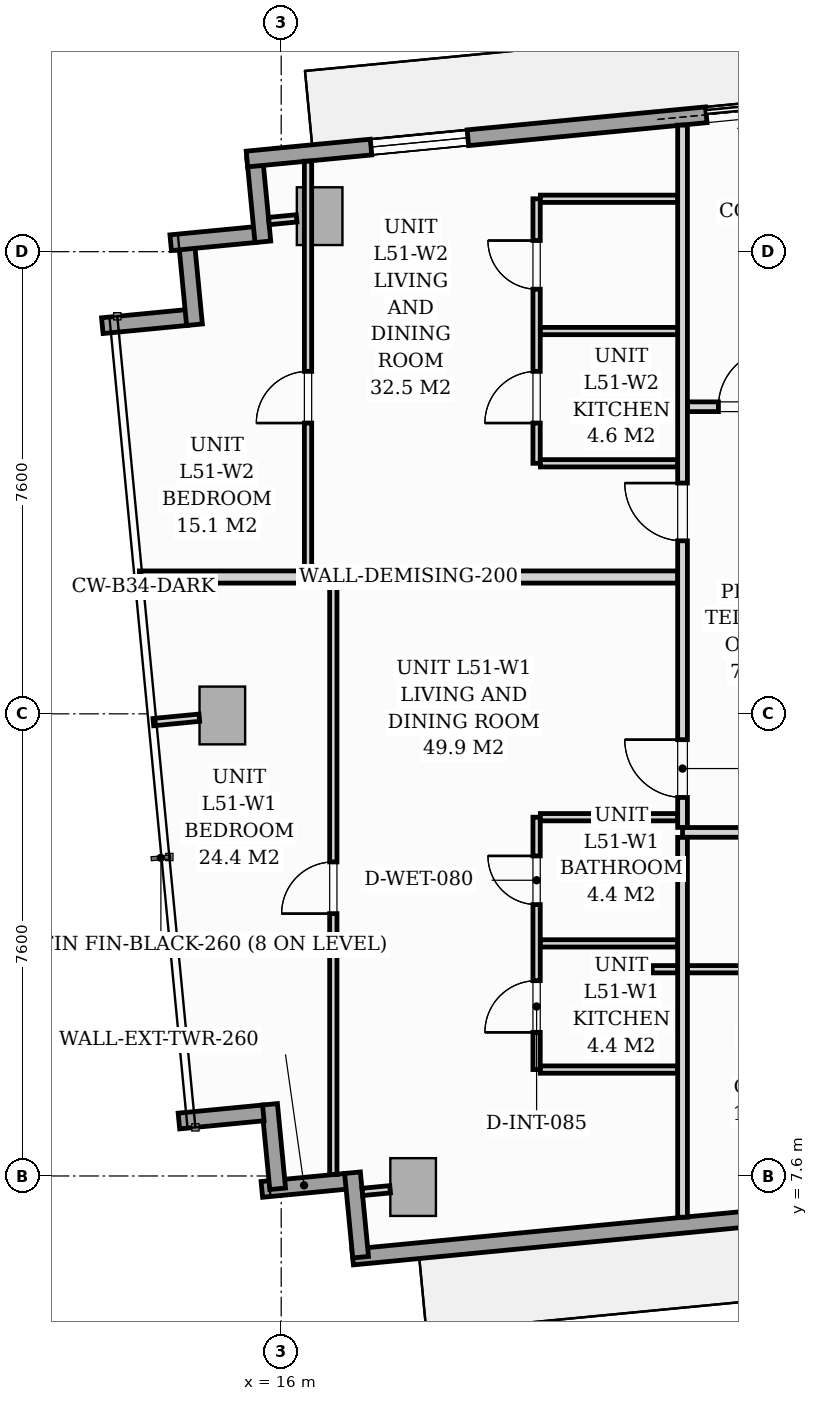
"""IFC4 building model, lengths in metres.
Left out: names, types, materials, properties, quantities, classifications, styles, units other than length and angle.
Written with IfcOpenShell. Run it as: python <this file> out.ifc"""

import sys

from ifc_helpers import new_model, si_unit, direction, frame, frame_2d, origin, origin_2d, place, context, subcontext, project, spatial, rectangle, extrude, source, transform, mapped, element, fill, save


model = new_model("IFC4")
c1 = context("Model", 3, precision=1e-05, world=origin(), true_north=direction((0.0, 1.0)))
c2 = subcontext(c1, "Body", "Model", "MODEL_VIEW")
j1 = project(units=[si_unit("LENGTHUNIT", "METRE"), si_unit("PLANEANGLEUNIT", "RADIAN")], contexts=[c1])
p1 = place(None, origin())
s1 = spatial("IfcSite", under=j1, at=p1, CompositionType="ELEMENT")
p2 = place(p1, origin())
s2 = spatial("IfcBuilding", under=s1, at=p2, CompositionType="ELEMENT")
p3 = place(p2, frame((0.0, 0.0, 179.4)))
s3 = spatial("IfcBuildingStorey", under=s2, at=p3, CompositionType="ELEMENT", Elevation=179.4)
m1 = source(origin(), c2, "Body", "SweptSolid", [
    extrude(rectangle(XDim=0.75, YDim=0.95, at=origin_2d()), origin(), (0.0, 0.0, 1.0), 3.196),
])
for number, where, z_axis, x_axis in (
    (1, (18.169, 7.418, 0.002), (0.0, 0.0, 1.0), (0.995, 0.096, 0.0)),
    (2, (16.632, 23.384, 0.002), (0.0, 0.0, 1.0), (0.995, 0.096, 0.0)),
    (3, (15.032, 15.173, 0.002), (0.0, 0.0, 1.0), (0.995, 0.096, 0.0)),
):
    element("IfcColumn", number, at=place(p3, frame(where, z_axis=z_axis, x_axis=x_axis)), inside=s3, PredefinedType="COLUMN", context=c2, shape_type="MappedRepresentation", body=[
        mapped(m1, transform((0.0, 0.0, 0.0), scale=1.0)),
    ])
p4 = place(p3, frame((17.07, 7.513, 0.0), z_axis=(0.0, 0.0, 1.0), x_axis=(-0.995391056452, -0.09589913835, 0.0)))
e4 = element("IfcWall", 4, at=p4, inside=s3, PredefinedType="STANDARD", context=c2, shape_type="SweptSolid", body=[
    extrude(rectangle(XDim=1.395, YDim=0.26, at=frame_2d((0.698, 0.0))), origin(), (0.0, 0.0, 1.0), 2.94),
])
p5 = place(p3, frame((15.942, 7.389, 0.0), z_axis=(0.0, 0.0, 1.0), x_axis=(-0.095742423056, 0.99540614245, 0.0)))
e5 = element("IfcWall", 5, at=p5, inside=s3, PredefinedType="STANDARD", context=c2, shape_type="SweptSolid", body=[
    extrude(rectangle(XDim=1.395, YDim=0.26, at=frame_2d((0.697, 0.0))), origin(), (0.0, 0.0, 1.0), 2.94),
])
for number, where, z_axis, x_axis in (
    (6, (15.706, 8.637, 0.0), (0.0, 0.0, 1.0), (-0.995, -0.096, 0.0)),
    (7, (13.058, 21.583, 0.0), (0.0, 0.0, 1.0), (0.995, 0.096, 0.0)),
):
    element("IfcWall", number, at=place(p3, frame(where, z_axis=z_axis, x_axis=x_axis)), inside=s3, PredefinedType="STANDARD", context=c2, shape_type="SweptSolid", body=[
        extrude(rectangle(XDim=1.395, YDim=0.26, at=frame_2d((0.698, 0.0))), origin(), (0.0, 0.0, 1.0), 2.94),
    ])
for number, where, z_axis, x_axis in (
    (8, (14.574, 21.599, 0.0), (0.0, 0.0, 1.0), (-0.096, 0.995, 0.0)),
    (9, (14.183, 22.947, 0.0), (0.0, 0.0, 1.0), (0.995, 0.096, 0.0)),
):
    element("IfcWall", number, at=place(p3, frame(where, z_axis=z_axis, x_axis=x_axis)), inside=s3, PredefinedType="STANDARD", context=c2, shape_type="SweptSolid", body=[
        extrude(rectangle(XDim=1.395, YDim=0.26, at=frame_2d((0.697, 0.0))), origin(), (0.0, 0.0, 1.0), 2.94),
    ])
p6 = place(p3, frame((15.698, 22.963, 0.0), z_axis=(0.0, 0.0, 1.0), x_axis=(-0.09589913835, 0.995391056452, 0.0)))
e10 = element("IfcWall", 10, at=p6, inside=s3, PredefinedType="STANDARD", context=c2, shape_type="SweptSolid", body=[
    extrude(rectangle(XDim=1.395, YDim=0.26, at=frame_2d((0.698, 0.0))), origin(), (0.0, 0.0, 1.0), 2.94),
])
p7 = place(p3, frame((15.437, 24.324, 0.0), z_axis=(0.0, 0.0, 1.0), x_axis=(0.995395627913, 0.095851676732, 0.0)))
e11 = element("IfcWall", 11, at=p7, inside=s3, PredefinedType="STANDARD", context=c2, shape_type="SweptSolid", body=[
    extrude(rectangle(XDim=16.1, YDim=0.26, at=frame_2d((8.05, 0.0))), origin(), (0.0, 0.0, 1.0), 2.94),
])
p8 = place(p7, frame((7.589, 0.0, 0.0)))
e12 = element("IfcOpeningElement", 12, at=p8, cuts=e11, PredefinedType="OPENING", context=c2, shape_type="SweptSolid", body=[
    extrude(rectangle(XDim=1.8, YDim=2.06, at=frame_2d((0.9, 1.03))), frame((0.0, 0.14, 0.0), z_axis=(0.0, -1.0, 0.0), x_axis=(1.0, 0.0, 0.0)), (0.0, 0.0, 1.0), 0.28),
])
p9 = place(p7, frame((2.05, 0.0, 0.65)))
e13 = element("IfcOpeningElement", 13, at=p9, cuts=e11, PredefinedType="OPENING", context=c2, shape_type="SweptSolid", body=[
    extrude(rectangle(XDim=1.6, YDim=1.5, at=frame_2d((0.8, 0.75))), frame((0.0, 0.14, 0.0), z_axis=(0.0, -1.0, 0.0), x_axis=(1.0, 0.0, 0.0)), (0.0, 0.0, 1.0), 0.28),
])
p10 = place(p3, frame((33.201, 7.81, 0.0), z_axis=(0.0, 0.0, 1.0), x_axis=(-0.995397074604, -0.095836652014, 0.0)))
e14 = element("IfcWall", 14, at=p10, inside=s3, PredefinedType="STANDARD", context=c2, shape_type="SweptSolid", body=[
    extrude(rectangle(XDim=16.1, YDim=0.26, at=frame_2d((8.05, 0.0))), origin(), (0.0, 0.0, 1.0), 2.94),
])
p11 = place(p10, frame((7.63, 0.0, 0.0)))
e15 = element("IfcOpeningElement", 15, at=p11, cuts=e14, PredefinedType="OPENING", context=c2, shape_type="SweptSolid", body=[
    extrude(rectangle(XDim=1.8, YDim=2.06, at=frame_2d((0.9, 1.03))), frame((0.0, 0.14, 0.0), z_axis=(0.0, -1.0, 0.0), x_axis=(1.0, 0.0, 0.0)), (0.0, 0.0, 1.0), 0.28),
])
p12 = place(p10, frame((0.7, 0.0, 0.65)))
e16 = element("IfcOpeningElement", 16, at=p12, cuts=e14, PredefinedType="OPENING", context=c2, shape_type="SweptSolid", body=[
    extrude(rectangle(XDim=1.6, YDim=1.5, at=frame_2d((0.8, 0.75))), frame((0.0, 0.14, 0.0), z_axis=(0.0, -1.0, 0.0), x_axis=(1.0, 0.0, 0.0)), (0.0, 0.0, 1.0), 0.28),
])
p13 = place(p3, frame((17.306, 6.265, 0.0), z_axis=(0.0, 0.0, 1.0), x_axis=(-0.095915846097, 0.995389446633, 0.0)))
e17 = element("IfcWall", 17, at=p13, inside=s3, PredefinedType="STANDARD", context=c2, shape_type="SweptSolid", body=[
    extrude(rectangle(XDim=1.395, YDim=0.26, at=frame_2d((0.697, 0.0))), origin(), (0.0, 0.0, 1.0), 2.94),
])
p14 = place(p3, frame((22.6, 13.25, 0.0), z_axis=(0.0, 0.0, 1.0), x_axis=(1.0, 0.0, 0.0)))
e18 = element("IfcWall", 18, at=p14, inside=s3, PredefinedType="PARTITIONING", context=c2, shape_type="SweptSolid", body=[
    extrude(rectangle(XDim=23.28, YDim=0.16, at=frame_2d((11.64, 0.0))), origin(), (0.0, 0.0, 1.0), 2.94),
])
p15 = place(p14, frame((3.335, 0.0, 0.0)))
e19 = element("IfcOpeningElement", 19, at=p15, cuts=e18, PredefinedType="OPENING", context=c2, shape_type="SweptSolid", body=[
    extrude(rectangle(XDim=0.95, YDim=2.06, at=frame_2d((0.475, 1.03))), frame((0.0, 0.09, 0.0), z_axis=(0.0, -1.0, 0.0), x_axis=(1.0, 0.0, 0.0)), (0.0, 0.0, 1.0), 0.18),
])
p16 = place(p14, frame((15.096, 0.0, 0.0)))
e20 = element("IfcOpeningElement", 20, at=p16, cuts=e18, PredefinedType="OPENING", context=c2, shape_type="SweptSolid", body=[
    extrude(rectangle(XDim=0.95, YDim=2.06, at=frame_2d((0.475, 1.03))), frame((0.0, 0.09, 0.0), z_axis=(0.0, -1.0, 0.0), x_axis=(1.0, 0.0, 0.0)), (0.0, 0.0, 1.0), 0.18),
])
p17 = place(p3, frame((22.6, 6.922, 0.0), z_axis=(0.0, 0.0, 1.0), x_axis=(0.0, 1.0, 0.0)))
e21 = element("IfcWall", 21, at=p17, inside=s3, PredefinedType="PARTITIONING", context=c2, shape_type="SweptSolid", body=[
    extrude(rectangle(XDim=6.246, YDim=0.16, at=frame_2d((3.123, 0.0))), origin(), (0.0, 0.0, 1.0), 2.94),
])
p18 = place(p3, frame((22.6, 13.332, 0.0), z_axis=(0.0, 0.0, 1.0), x_axis=(0.0, 1.0, 0.0)))
e22 = element("IfcWall", 22, at=p18, inside=s3, PredefinedType="PARTITIONING", context=c2, shape_type="SweptSolid", body=[
    extrude(rectangle(XDim=11.549, YDim=0.16, at=frame_2d((5.774, 0.0))), origin(), (0.0, 0.0, 1.0), 2.94),
])
p19 = place(p18, frame((0.493, 0.0, 0.0)))
e23 = element("IfcOpeningElement", 23, at=p19, cuts=e22, PredefinedType="OPENING", context=c2, shape_type="SweptSolid", body=[
    extrude(rectangle(XDim=0.95, YDim=2.06, at=frame_2d((0.475, 1.03))), frame((0.0, 0.09, 0.0), z_axis=(0.0, -1.0, 0.0), x_axis=(1.0, 0.0, 0.0)), (0.0, 0.0, 1.0), 0.18),
])
p20 = place(p18, frame((4.713, 0.0, 0.0)))
e24 = element("IfcOpeningElement", 24, at=p20, cuts=e22, PredefinedType="OPENING", context=c2, shape_type="SweptSolid", body=[
    extrude(rectangle(XDim=0.95, YDim=2.06, at=frame_2d((0.475, 1.03))), frame((0.0, 0.09, 0.0), z_axis=(0.0, -1.0, 0.0), x_axis=(1.0, 0.0, 0.0)), (0.0, 0.0, 1.0), 0.18),
])
p21 = place(p3, frame((22.1, 11.0, 0.0), z_axis=(0.0, 0.0, 1.0), x_axis=(1.0, 0.0, 0.0)))
e25 = element("IfcWall", 25, at=p21, inside=s3, PredefinedType="PARTITIONING", context=c2, shape_type="SweptSolid", body=[
    extrude(rectangle(XDim=0.418, YDim=0.12, at=frame_2d((0.209, 0.0))), origin(), (0.0, 0.0, 1.0), 2.94),
])
p22 = place(p3, frame((22.682, 11.0, 0.0), z_axis=(0.0, 0.0, 1.0), x_axis=(1.0, 0.0, 0.0)))
e26 = element("IfcWall", 26, at=p22, inside=s3, PredefinedType="PARTITIONING", context=c2, shape_type="SweptSolid", body=[
    extrude(rectangle(XDim=3.219, YDim=0.12, at=frame_2d((1.609, 0.0))), origin(), (0.0, 0.0, 1.0), 2.94),
])
p23 = place(p3, frame((13.667, 17.45, 0.0), z_axis=(0.0, 0.0, 1.0), x_axis=(1.0, 0.0, 0.0)))
e27 = element("IfcWall", 27, at=p23, inside=s3, PredefinedType="PARTITIONING", context=c2, shape_type="SweptSolid", body=[
    extrude(rectangle(XDim=8.851, YDim=0.2, at=frame_2d((4.425, 0.0))), origin(), (0.0, 0.0, 1.0), 2.94),
])
p24 = place(p3, frame((20.2, 9.35, 0.0), z_axis=(0.0, 0.0, 1.0), x_axis=(0.0, 1.0, 0.0)))
e28 = element("IfcWall", 28, at=p24, inside=s3, PredefinedType="PARTITIONING", context=c2, shape_type="SweptSolid", body=[
    extrude(rectangle(XDim=4.15, YDim=0.12, at=frame_2d((2.075, 0.0))), origin(), (0.0, 0.0, 1.0), 2.94),
])
p25 = place(p24, frame((0.612, 0.0, 0.0)))
e29 = element("IfcOpeningElement", 29, at=p25, cuts=e28, PredefinedType="OPENING", context=c2, shape_type="SweptSolid", body=[
    extrude(rectangle(XDim=0.85, YDim=2.05, at=frame_2d((0.425, 1.025))), frame((0.0, 0.07, 0.0), z_axis=(0.0, -1.0, 0.0), x_axis=(1.0, 0.0, 0.0)), (0.0, 0.0, 1.0), 0.14),
])
p26 = place(p24, frame((2.713, 0.0, 0.0)))
e30 = element("IfcOpeningElement", 30, at=p26, cuts=e28, PredefinedType="OPENING", context=c2, shape_type="SweptSolid", body=[
    extrude(rectangle(XDim=0.8, YDim=2.02, at=frame_2d((0.4, 1.01))), frame((0.0, 0.07, 0.0), z_axis=(0.0, -1.0, 0.0), x_axis=(1.0, 0.0, 0.0)), (0.0, 0.0, 1.0), 0.14),
])
for number, where, z_axis, x_axis in (
    (31, (20.262, 11.425, 0.0), (0.0, 0.0, 1.0), (1.0, 0.0, 0.0)),
    (32, (20.262, 9.35, 0.0), (0.0, 0.0, 1.0), (1.0, 0.0, 0.0)),
    (33, (20.262, 13.5, 0.0), (0.0, 0.0, 1.0), (1.0, 0.0, 0.0)),
):
    element("IfcWall", number, at=place(p3, frame(where, z_axis=z_axis, x_axis=x_axis)), inside=s3, PredefinedType="PARTITIONING", context=c2, shape_type="SweptSolid", body=[
        extrude(rectangle(XDim=2.256, YDim=0.12, at=frame_2d((1.128, 0.0))), origin(), (0.0, 0.0, 1.0), 2.94),
    ])
p27 = place(p3, frame((16.857, 7.625, 0.0), z_axis=(0.0, 0.0, 1.0), x_axis=(0.0, 1.0, 0.0)))
e34 = element("IfcWall", 34, at=p27, inside=s3, PredefinedType="PARTITIONING", context=c2, shape_type="SweptSolid", body=[
    extrude(rectangle(XDim=9.723, YDim=0.12, at=frame_2d((4.861, 0.0))), origin(), (0.0, 0.0, 1.0), 2.94),
])
p28 = place(p27, frame((4.289, 0.0, 0.0)))
e35 = element("IfcOpeningElement", 35, at=p28, cuts=e34, PredefinedType="OPENING", context=c2, shape_type="SweptSolid", body=[
    extrude(rectangle(XDim=0.85, YDim=2.05, at=frame_2d((0.425, 1.025))), frame((0.0, 0.07, 0.0), z_axis=(0.0, -1.0, 0.0), x_axis=(1.0, 0.0, 0.0)), (0.0, 0.0, 1.0), 0.14),
])
p29 = place(p3, frame((20.2, 19.32, 0.0), z_axis=(0.0, 0.0, 1.0), x_axis=(0.0, 1.0, 0.0)))
e36 = element("IfcWall", 36, at=p29, inside=s3, PredefinedType="PARTITIONING", context=c2, shape_type="SweptSolid", body=[
    extrude(rectangle(XDim=4.35, YDim=0.12, at=frame_2d((2.175, 0.0))), origin(), (0.0, 0.0, 1.0), 2.94),
])
p30 = place(p29, frame((0.662, 0.0, 0.0)))
e37 = element("IfcOpeningElement", 37, at=p30, cuts=e36, PredefinedType="OPENING", context=c2, shape_type="SweptSolid", body=[
    extrude(rectangle(XDim=0.85, YDim=2.05, at=frame_2d((0.425, 1.025))), frame((0.0, 0.07, 0.0), z_axis=(0.0, -1.0, 0.0), x_axis=(1.0, 0.0, 0.0)), (0.0, 0.0, 1.0), 0.14),
])
p31 = place(p29, frame((2.863, 0.0, 0.0)))
e38 = element("IfcOpeningElement", 38, at=p31, cuts=e36, PredefinedType="OPENING", context=c2, shape_type="SweptSolid", body=[
    extrude(rectangle(XDim=0.8, YDim=2.02, at=frame_2d((0.4, 1.01))), frame((0.0, 0.07, 0.0), z_axis=(0.0, -1.0, 0.0), x_axis=(1.0, 0.0, 0.0)), (0.0, 0.0, 1.0), 0.14),
])
for number, where, z_axis, x_axis in (
    (39, (20.262, 21.495, 0.0), (0.0, 0.0, 1.0), (1.0, 0.0, 0.0)),
    (40, (20.262, 19.32, 0.0), (0.0, 0.0, 1.0), (1.0, 0.0, 0.0)),
):
    element("IfcWall", number, at=place(p3, frame(where, z_axis=z_axis, x_axis=x_axis)), inside=s3, PredefinedType="PARTITIONING", context=c2, shape_type="SweptSolid", body=[
        extrude(rectangle(XDim=2.256, YDim=0.12, at=frame_2d((1.128, 0.0))), origin(), (0.0, 0.0, 1.0), 2.94),
    ])
p32 = place(p3, frame((20.262, 23.67, 0.0), z_axis=(0.0, 0.0, 1.0), x_axis=(1.0, 0.0, 0.0)))
e41 = element("IfcWall", 41, at=p32, inside=s3, PredefinedType="PARTITIONING", context=c2, shape_type="SweptSolid", body=[
    extrude(rectangle(XDim=2.256, YDim=0.12, at=frame_2d((1.128, 0.0))), origin(), (0.0, 0.0, 1.0), 2.3),
])
p33 = place(p3, frame((16.441, 17.552, 0.0), z_axis=(0.0, 0.0, 1.0), x_axis=(0.0, 1.0, 0.0)))
e42 = element("IfcWall", 42, at=p33, inside=s3, PredefinedType="PARTITIONING", context=c2, shape_type="SweptSolid", body=[
    extrude(rectangle(XDim=6.736, YDim=0.12, at=frame_2d((3.368, 0.0))), origin(), (0.0, 0.0, 1.0), 2.383),
])
p34 = place(p33, frame((2.43, 0.0, 0.0)))
e43 = element("IfcOpeningElement", 43, at=p34, cuts=e42, PredefinedType="OPENING", context=c2, shape_type="SweptSolid", body=[
    extrude(rectangle(XDim=0.85, YDim=2.05, at=frame_2d((0.425, 1.025))), frame((0.0, 0.07, 0.0), z_axis=(0.0, -1.0, 0.0), x_axis=(1.0, 0.0, 0.0)), (0.0, 0.0, 1.0), 0.14),
])
p35 = place(p3, frame((22.682, 20.25, 0.0), z_axis=(0.0, 0.0, 1.0), x_axis=(1.0, 0.0, 0.0)))
e44 = element("IfcWall", 44, at=p35, inside=s3, PredefinedType="PARTITIONING", context=c2, shape_type="SweptSolid", body=[
    extrude(rectangle(XDim=1.886, YDim=0.16, at=frame_2d((0.943, 0.0))), origin(), (0.0, 0.0, 1.0), 2.94),
])
p36 = place(p35, frame((0.508, 0.0, 0.0)))
e45 = element("IfcOpeningElement", 45, at=p36, cuts=e44, PredefinedType="OPENING", context=c2, shape_type="SweptSolid", body=[
    extrude(rectangle(XDim=0.95, YDim=2.06, at=frame_2d((0.475, 1.03))), frame((0.0, 0.09, 0.0), z_axis=(0.0, -1.0, 0.0), x_axis=(1.0, 0.0, 0.0)), (0.0, 0.0, 1.0), 0.18),
])
for number, where, z_axis, x_axis in (
    (46, (17.791, 7.382, 0.0), (0.0, 0.0, 1.0), (-0.995, -0.096, 0.0)),
    (47, (16.254, 23.348, 0.0), (0.0, 0.0, 1.0), (-0.995, -0.096, 0.0)),
):
    element("IfcWall", number, at=place(p3, frame(where, z_axis=z_axis, x_axis=x_axis)), inside=s3, PredefinedType="PARTITIONING", context=c2, shape_type="SweptSolid", body=[
        extrude(rectangle(XDim=0.458, YDim=0.12, at=frame_2d((0.229, 0.0))), origin(), (0.0, 0.0, 1.0), 2.94),
    ])
p37 = place(p3, frame((14.654, 15.136, 0.0), z_axis=(0.0, 0.0, 1.0), x_axis=(-0.995408440582, -0.095718527039, 0.0)))
e48 = element("IfcWall", 48, at=p37, inside=s3, PredefinedType="PARTITIONING", context=c2, shape_type="SweptSolid", body=[
    extrude(rectangle(XDim=0.76, YDim=0.12, at=frame_2d((0.38, 0.0))), origin(), (0.0, 0.0, 1.0), 2.94),
])
m2 = source(origin(), c2, "Body", "SweptSolid", [
    extrude(rectangle(XDim=1.8, YDim=2.06, at=frame_2d((0.9, 1.03))), frame((0.0, 0.025, 0.0), z_axis=(0.0, -1.0, 0.0), x_axis=(1.0, 0.0, 0.0)), (0.0, 0.0, 1.0), 0.05),
])
p38 = place(p8, origin())
e49 = element("IfcDoor", 49, at=p38, inside=s3, OperationType="SLIDING_TO_LEFT", PredefinedType="DOOR", context=c2, shape_type="MappedRepresentation", body=[
    mapped(m2, transform((0.0, 0.0, 0.0), scale=1.0)),
])
fill(e12, e49)
m3 = source(origin(), c2, "Body", "SweptSolid", [
    extrude(rectangle(XDim=1.6, YDim=1.5, at=frame_2d((0.8, 0.75))), frame((0.0, 0.03, 0.0), z_axis=(0.0, -1.0, 0.0), x_axis=(1.0, 0.0, 0.0)), (0.0, 0.0, 1.0), 0.06),
])
p39 = place(p9, origin())
e50 = element("IfcWindow", 50, at=p39, inside=s3, PartitioningType="SINGLE_PANEL", PredefinedType="WINDOW", context=c2, shape_type="MappedRepresentation", body=[
    mapped(m3, transform((0.0, 0.0, 0.0), scale=1.0)),
])
fill(e13, e50)
m4 = source(origin(), c2, "Body", "SweptSolid", [
    extrude(rectangle(XDim=0.95, YDim=2.06, at=frame_2d((0.475, 1.03))), frame((0.0, 0.025, 0.0), z_axis=(0.0, -1.0, 0.0), x_axis=(1.0, 0.0, 0.0)), (0.0, 0.0, 1.0), 0.05),
])
p40 = place(p19, origin())
e51 = element("IfcDoor", 51, at=p40, inside=s3, OperationType="SINGLE_SWING_RIGHT", PredefinedType="DOOR", context=c2, shape_type="MappedRepresentation", body=[
    mapped(m4, transform((0.0, 0.0, 0.0), scale=1.0)),
])
fill(e23, e51)
m5 = source(origin(), c2, "Body", "SweptSolid", [
    extrude(rectangle(XDim=0.85, YDim=2.05, at=frame_2d((0.425, 1.025))), frame((0.0, 0.025, 0.0), z_axis=(0.0, -1.0, 0.0), x_axis=(1.0, 0.0, 0.0)), (0.0, 0.0, 1.0), 0.05),
])
p41 = place(p25, origin())
e52 = element("IfcDoor", 52, at=p41, inside=s3, OperationType="SINGLE_SWING_LEFT", PredefinedType="DOOR", context=c2, shape_type="MappedRepresentation", body=[
    mapped(m5, transform((0.0, 0.0, 0.0), scale=1.0)),
])
fill(e29, e52)
m6 = source(origin(), c2, "Body", "SweptSolid", [
    extrude(rectangle(XDim=0.8, YDim=2.02, at=frame_2d((0.4, 1.01))), frame((0.0, 0.025, 0.0), z_axis=(0.0, -1.0, 0.0), x_axis=(1.0, 0.0, 0.0)), (0.0, 0.0, 1.0), 0.05),
])
p42 = place(p26, origin())
e53 = element("IfcDoor", 53, at=p42, inside=s3, OperationType="SINGLE_SWING_RIGHT", PredefinedType="DOOR", context=c2, shape_type="MappedRepresentation", body=[
    mapped(m6, transform((0.0, 0.0, 0.0), scale=1.0)),
])
fill(e30, e53)
p43 = place(p28, origin())
e54 = element("IfcDoor", 54, at=p43, inside=s3, OperationType="SINGLE_SWING_LEFT", PredefinedType="DOOR", context=c2, shape_type="MappedRepresentation", body=[
    mapped(m5, transform((0.0, 0.0, 0.0), scale=1.0)),
])
fill(e35, e54)
p44 = place(p20, origin())
e55 = element("IfcDoor", 55, at=p44, inside=s3, OperationType="SINGLE_SWING_RIGHT", PredefinedType="DOOR", context=c2, shape_type="MappedRepresentation", body=[
    mapped(m4, transform((0.0, 0.0, 0.0), scale=1.0)),
])
fill(e24, e55)
p45 = place(p30, origin())
e56 = element("IfcDoor", 56, at=p45, inside=s3, OperationType="SINGLE_SWING_LEFT", PredefinedType="DOOR", context=c2, shape_type="MappedRepresentation", body=[
    mapped(m5, transform((0.0, 0.0, 0.0), scale=1.0)),
])
fill(e37, e56)
p46 = place(p31, origin())
e57 = element("IfcDoor", 57, at=p46, inside=s3, OperationType="SINGLE_SWING_RIGHT", PredefinedType="DOOR", context=c2, shape_type="MappedRepresentation", body=[
    mapped(m6, transform((0.0, 0.0, 0.0), scale=1.0)),
])
fill(e38, e57)
p47 = place(p34, origin())
e58 = element("IfcDoor", 58, at=p47, inside=s3, OperationType="SINGLE_SWING_LEFT", PredefinedType="DOOR", context=c2, shape_type="MappedRepresentation", body=[
    mapped(m5, transform((0.0, 0.0, 0.0), scale=1.0)),
])
fill(e43, e58)
p48 = place(p36, origin())
e59 = element("IfcDoor", 59, at=p48, inside=s3, OperationType="SINGLE_SWING_RIGHT", PredefinedType="DOOR", context=c2, shape_type="MappedRepresentation", body=[
    mapped(m4, transform((0.0, 0.0, 0.0), scale=1.0)),
])
fill(e45, e59)
save(model, sys.argv[1])
